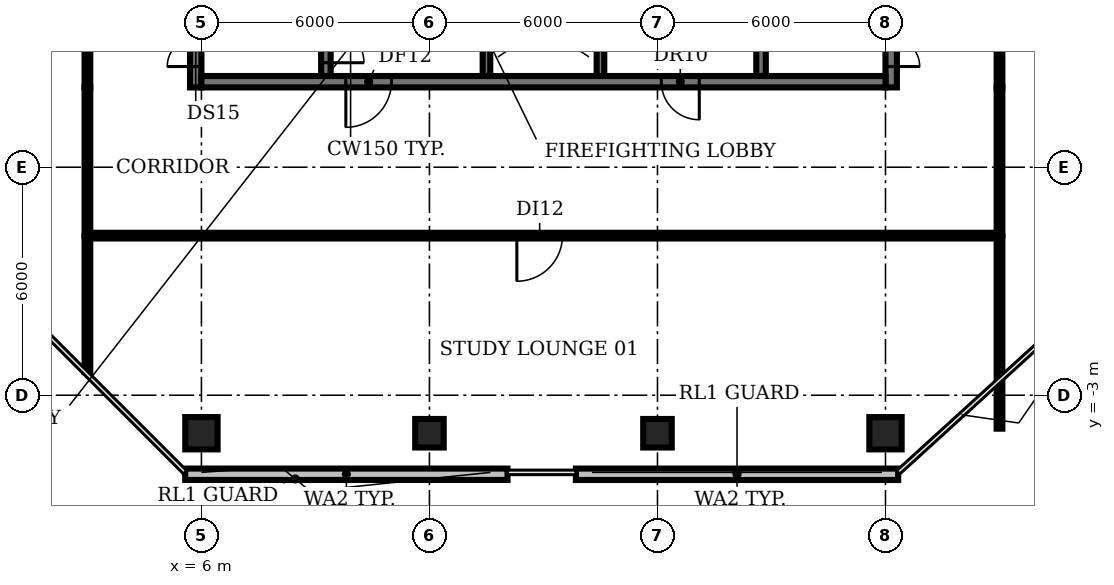
"""IFC4 building model, lengths in metres.
Left out: names, types, materials, properties, quantities, classifications, styles, units other than length and angle.
Written with IfcOpenShell. Run it as: python <this file> out.ifc"""

import sys

from ifc_helpers import new_model, si_unit, direction, frame, frame_2d, origin, origin_2d, place, context, subcontext, project, spatial, rectangle, circle, extrude, element, fill, save


model = new_model("IFC4")
c1 = context("Model", 3, precision=1e-05, world=origin(), true_north=direction((0.0, 1.0)))
c2 = subcontext(c1, "Body", "Model", "MODEL_VIEW")
j1 = project(units=[si_unit("LENGTHUNIT", "METRE"), si_unit("PLANEANGLEUNIT", "RADIAN")], contexts=[c1])
p1 = place(None, origin())
s1 = spatial("IfcSite", under=j1, at=p1, CompositionType="ELEMENT")
p2 = place(p1, origin())
s2 = spatial("IfcBuilding", under=s1, at=p2, CompositionType="ELEMENT")
p3 = place(p2, frame((0.0, 0.0, 310.4)))
s3 = spatial("IfcBuildingStorey", under=s2, at=p3, CompositionType="ELEMENT", Elevation=310.4)
p4 = place(p3, frame((6.0, -4.0, 0.0), z_axis=(0.0, 0.0, 1.0), x_axis=(1.0, 0.0, 0.0)))
e1 = element("IfcColumn", 1, at=p4, inside=s3, PredefinedType="COLUMN", context=c2, shape_type="SweptSolid", body=[
    extrude(circle(Radius=0.425, at=origin_2d()), origin(), (0.0, 0.0, 1.0), 3.9),
])
for number, where, z_axis, x_axis in (
    (2, (12.0, -4.0, 0.0), (0.0, 0.0, 1.0), (1.0, 0.0, 0.0)),
    (3, (18.0, -4.0, 0.0), (0.0, 0.0, 1.0), (1.0, 0.0, 0.0)),
):
    element("IfcColumn", number, at=place(p3, frame(where, z_axis=z_axis, x_axis=x_axis)), inside=s3, PredefinedType="COLUMN", context=c2, shape_type="SweptSolid", body=[
        extrude(rectangle(XDim=0.75, YDim=0.75, at=origin_2d()), origin(), (0.0, 0.0, 1.0), 3.9),
    ])
p5 = place(p3, frame((24.0, -4.0, 0.0), z_axis=(0.0, 0.0, 1.0), x_axis=(1.0, 0.0, 0.0)))
e4 = element("IfcColumn", 4, at=p5, inside=s3, PredefinedType="COLUMN", context=c2, shape_type="SweptSolid", body=[
    extrude(circle(Radius=0.425, at=origin_2d()), origin(), (0.0, 0.0, 1.0), 3.9),
])
for number, where, z_axis, x_axis in (
    (5, (5.573, -5.08, 0.0), (0.0, 0.0, 1.0), (1.0, 0.0, 0.0)),
    (6, (15.854, -5.08, 0.0), (0.0, 0.0, 1.0), (1.0, 0.0, 0.0)),
):
    element("IfcWall", number, at=place(p3, frame(where, z_axis=z_axis, x_axis=x_axis)), inside=s3, PredefinedType="SOLIDWALL", context=c2, shape_type="SweptSolid", body=[
        extrude(rectangle(XDim=8.48, YDim=0.3, at=frame_2d((4.24, 0.0))), origin(), (0.0, 0.0, 1.0), 3.9),
    ])
p6 = place(p3, frame((9.275, 11.825, 0.0), z_axis=(0.0, 0.0, 1.0), x_axis=(0.0, -1.0, 0.0)))
e7 = element("IfcWall", 7, at=p6, inside=s3, PredefinedType="SHEAR", context=c2, shape_type="SweptSolid", body=[
    extrude(rectangle(XDim=6.425, YDim=0.25, at=frame_2d((3.212, 0.0))), origin(), (0.0, 0.0, 1.0), 3.9),
])
p7 = place(p6, frame((5.075, 0.0, 0.0)))
e8 = element("IfcOpeningElement", 8, at=p7, cuts=e7, PredefinedType="OPENING", context=c2, shape_type="SweptSolid", body=[
    extrude(rectangle(XDim=1.0, YDim=2.1, at=frame_2d((0.5, 1.05))), frame((0.0, 0.135, 0.0), z_axis=(0.0, -1.0, 0.0), x_axis=(1.0, 0.0, 0.0)), (0.0, 0.0, 1.0), 0.27),
])
p8 = place(p3, frame((13.5, 5.4, 0.0), z_axis=(0.0, 0.0, 1.0), x_axis=(0.0, 1.0, 0.0)))
e9 = element("IfcWall", 9, at=p8, inside=s3, PredefinedType="SHEAR", context=c2, shape_type="SweptSolid", body=[
    extrude(rectangle(XDim=8.2, YDim=0.2, at=frame_2d((4.1, 0.0))), origin(), (0.0, 0.0, 1.0), 3.9),
])
p9 = place(p8, frame((0.75, 0.0, 0.0)))
e10 = element("IfcOpeningElement", 10, at=p9, cuts=e9, PredefinedType="OPENING", context=c2, shape_type="SweptSolid", body=[
    extrude(rectangle(XDim=1.1, YDim=2.1, at=frame_2d((0.55, 1.05))), frame((0.0, 0.11, 0.0), z_axis=(0.0, -1.0, 0.0), x_axis=(1.0, 0.0, 0.0)), (0.0, 0.0, 1.0), 0.22),
])
p10 = place(p8, frame((3.55, 0.0, 0.0)))
e11 = element("IfcOpeningElement", 11, at=p10, cuts=e9, PredefinedType="OPENING", context=c2, shape_type="SweptSolid", body=[
    extrude(rectangle(XDim=1.1, YDim=2.1, at=frame_2d((0.55, 1.05))), frame((0.0, 0.11, 0.0), z_axis=(0.0, -1.0, 0.0), x_axis=(1.0, 0.0, 0.0)), (0.0, 0.0, 1.0), 0.22),
])
p11 = place(p8, frame((6.35, 0.0, 0.0)))
e12 = element("IfcOpeningElement", 12, at=p11, cuts=e9, PredefinedType="OPENING", context=c2, shape_type="SweptSolid", body=[
    extrude(rectangle(XDim=1.1, YDim=2.1, at=frame_2d((0.55, 1.05))), frame((0.0, 0.11, 0.0), z_axis=(0.0, -1.0, 0.0), x_axis=(1.0, 0.0, 0.0)), (0.0, 0.0, 1.0), 0.22),
])
p12 = place(p3, frame((16.5, 5.4, 0.0), z_axis=(0.0, 0.0, 1.0), x_axis=(0.0, 1.0, 0.0)))
e13 = element("IfcWall", 13, at=p12, inside=s3, PredefinedType="SHEAR", context=c2, shape_type="SweptSolid", body=[
    extrude(rectangle(XDim=8.2, YDim=0.2, at=frame_2d((4.1, 0.0))), origin(), (0.0, 0.0, 1.0), 3.9),
])
p13 = place(p3, frame((20.725, 5.4, 0.0), z_axis=(0.0, 0.0, 1.0), x_axis=(0.0, 1.0, 0.0)))
e14 = element("IfcWall", 14, at=p13, inside=s3, PredefinedType="SHEAR", context=c2, shape_type="SweptSolid", body=[
    extrude(rectangle(XDim=6.3, YDim=0.25, at=frame_2d((3.15, 0.0))), origin(), (0.0, 0.0, 1.0), 3.9),
])
p14 = place(p3, frame((5.85, 5.1, 0.0), z_axis=(0.0, 0.0, 1.0), x_axis=(0.0, 1.0, 0.0)))
e15 = element("IfcWall", 15, at=p14, inside=s3, PredefinedType="SHEAR", context=c2, shape_type="SweptSolid", body=[
    extrude(rectangle(XDim=20.0, YDim=0.3, at=frame_2d((10.0, 0.0))), origin(), (0.0, 0.0, 1.0), 3.9),
])
p15 = place(p14, frame((0.55, 0.0, 0.0)))
e16 = element("IfcOpeningElement", 16, at=p15, cuts=e15, PredefinedType="OPENING", context=c2, shape_type="SweptSolid", body=[
    extrude(rectangle(XDim=1.5, YDim=2.1, at=frame_2d((0.75, 1.05))), frame((0.0, 0.16, 0.0), z_axis=(0.0, -1.0, 0.0), x_axis=(1.0, 0.0, 0.0)), (0.0, 0.0, 1.0), 0.32),
])
p16 = place(p14, frame((7.0, 0.0, 0.0)))
e17 = element("IfcOpeningElement", 17, at=p16, cuts=e15, PredefinedType="OPENING", context=c2, shape_type="SweptSolid", body=[
    extrude(rectangle(XDim=1.2, YDim=2.1, at=frame_2d((0.6, 1.05))), frame((0.0, 0.16, 0.0), z_axis=(0.0, -1.0, 0.0), x_axis=(1.0, 0.0, 0.0)), (0.0, 0.0, 1.0), 0.32),
])
p17 = place(p14, frame((13.55, 0.0, 0.0)))
e18 = element("IfcOpeningElement", 18, at=p17, cuts=e15, PredefinedType="OPENING", context=c2, shape_type="SweptSolid", body=[
    extrude(rectangle(XDim=1.2, YDim=2.1, at=frame_2d((0.6, 1.05))), frame((0.0, 0.16, 0.0), z_axis=(0.0, -1.0, 0.0), x_axis=(1.0, 0.0, 0.0)), (0.0, 0.0, 1.0), 0.32),
])
p18 = place(p3, frame((24.15, 25.655, 0.0), z_axis=(0.0, 0.0, 1.0), x_axis=(0.0, -1.0, 0.0)))
e19 = element("IfcWall", 19, at=p18, inside=s3, PredefinedType="SHEAR", context=c2, shape_type="SweptSolid", body=[
    extrude(rectangle(XDim=20.555, YDim=0.3, at=frame_2d((10.277, 0.0))), origin(), (0.0, 0.0, 1.0), 3.9),
])
p19 = place(p18, frame((18.505, 0.0, 0.0)))
e20 = element("IfcOpeningElement", 20, at=p19, cuts=e19, PredefinedType="OPENING", context=c2, shape_type="SweptSolid", body=[
    extrude(rectangle(XDim=1.5, YDim=2.1, at=frame_2d((0.75, 1.05))), frame((0.0, 0.16, 0.0), z_axis=(0.0, -1.0, 0.0), x_axis=(1.0, 0.0, 0.0)), (0.0, 0.0, 1.0), 0.32),
])
p20 = place(p18, frame((12.405, 0.0, 0.0)))
e21 = element("IfcOpeningElement", 21, at=p20, cuts=e19, PredefinedType="OPENING", context=c2, shape_type="SweptSolid", body=[
    extrude(rectangle(XDim=0.9, YDim=2.1, at=frame_2d((0.45, 1.05))), frame((0.0, 0.16, 0.0), z_axis=(0.0, -1.0, 0.0), x_axis=(1.0, 0.0, 0.0)), (0.0, 0.0, 1.0), 0.32),
])
p21 = place(p18, frame((6.405, 0.0, 0.0)))
e22 = element("IfcOpeningElement", 22, at=p21, cuts=e19, PredefinedType="OPENING", context=c2, shape_type="SweptSolid", body=[
    extrude(rectangle(XDim=2.0, YDim=2.1, at=frame_2d((1.0, 1.05))), frame((0.0, 0.16, 0.0), z_axis=(0.0, -1.0, 0.0), x_axis=(1.0, 0.0, 0.0)), (0.0, 0.0, 1.0), 0.32),
])
p22 = place(p3, frame((24.0, 5.25, 0.0), z_axis=(0.0, 0.0, 1.0), x_axis=(-1.0, 0.0, 0.0)))
e23 = element("IfcWall", 23, at=p22, inside=s3, PredefinedType="SHEAR", context=c2, shape_type="SweptSolid", body=[
    extrude(rectangle(XDim=18.0, YDim=0.3, at=frame_2d((9.0, 0.0))), origin(), (0.0, 0.0, 1.0), 3.9),
])
p23 = place(p22, frame((13.0, 0.0, 0.0)))
e24 = element("IfcOpeningElement", 24, at=p23, cuts=e23, PredefinedType="OPENING", context=c2, shape_type="SweptSolid", body=[
    extrude(rectangle(XDim=1.2, YDim=2.1, at=frame_2d((0.6, 1.05))), frame((0.0, 0.16, 0.0), z_axis=(0.0, -1.0, 0.0), x_axis=(1.0, 0.0, 0.0)), (0.0, 0.0, 1.0), 0.32),
])
p24 = place(p22, frame((4.9, 0.0, 0.0)))
e25 = element("IfcOpeningElement", 25, at=p24, cuts=e23, PredefinedType="OPENING", context=c2, shape_type="SweptSolid", body=[
    extrude(rectangle(XDim=1.0, YDim=2.1, at=frame_2d((0.5, 1.05))), frame((0.0, 0.16, 0.0), z_axis=(0.0, -1.0, 0.0), x_axis=(1.0, 0.0, 0.0)), (0.0, 0.0, 1.0), 0.32),
])
p25 = place(p3, frame((3.0, -2.39, 0.0), z_axis=(0.0, 0.0, 1.0), x_axis=(0.0, 1.0, 0.0)))
e26 = element("IfcWall", 26, at=p25, inside=s3, PredefinedType="PARTITIONING", context=c2, shape_type="SweptSolid", body=[
    extrude(rectangle(XDim=3.59, YDim=0.15, at=frame_2d((1.795, 0.0))), origin(), (0.0, 0.0, 1.0), 2.48),
])
p26 = place(p3, frame((3.0, 1.2, 0.0), z_axis=(0.0, 0.0, 1.0), x_axis=(0.0, 1.0, 0.0)))
e27 = element("IfcWall", 27, at=p26, inside=s3, PredefinedType="PARTITIONING", context=c2, shape_type="SweptSolid", body=[
    extrude(rectangle(XDim=3.9, YDim=0.15, at=frame_2d((1.95, 0.0))), origin(), (0.0, 0.0, 1.0), 2.48),
])
p27 = place(p3, frame((3.0, 5.1, 0.0), z_axis=(0.0, 0.0, 1.0), x_axis=(0.0, 1.0, 0.0)))
e28 = element("IfcWall", 28, at=p27, inside=s3, PredefinedType="PARTITIONING", context=c2, shape_type="SweptSolid", body=[
    extrude(rectangle(XDim=20.0, YDim=0.15, at=frame_2d((10.0, 0.0))), origin(), (0.0, 0.0, 1.0), 2.48),
])
p28 = place(p27, frame((9.3, 0.0, 0.0)))
e29 = element("IfcOpeningElement", 29, at=p28, cuts=e28, PredefinedType="OPENING", context=c2, shape_type="SweptSolid", body=[
    extrude(rectangle(XDim=1.2, YDim=2.1, at=frame_2d((0.6, 1.05))), frame((0.0, 0.085, 0.0), z_axis=(0.0, -1.0, 0.0), x_axis=(1.0, 0.0, 0.0)), (0.0, 0.0, 1.0), 0.17),
])
p29 = place(p3, frame((27.0, -3.88, 0.0), z_axis=(0.0, 0.0, 1.0), x_axis=(0.0, 1.0, 0.0)))
e30 = element("IfcWall", 30, at=p29, inside=s3, PredefinedType="PARTITIONING", context=c2, shape_type="SweptSolid", body=[
    extrude(rectangle(XDim=5.08, YDim=0.15, at=frame_2d((2.54, 0.0))), origin(), (0.0, 0.0, 1.0), 2.48),
])
p30 = place(p3, frame((27.0, 1.2, 0.0), z_axis=(0.0, 0.0, 1.0), x_axis=(-1.0, 0.0, 0.0)))
e31 = element("IfcWall", 31, at=p30, inside=s3, PredefinedType="PARTITIONING", context=c2, shape_type="SweptSolid", body=[
    extrude(rectangle(XDim=24.0, YDim=0.15, at=frame_2d((12.0, 0.0))), origin(), (0.0, 0.0, 1.0), 2.48),
])
p31 = place(p30, frame((11.5, 0.0, 0.0)))
e32 = element("IfcOpeningElement", 32, at=p31, cuts=e31, PredefinedType="OPENING", context=c2, shape_type="SweptSolid", body=[
    extrude(rectangle(XDim=1.2, YDim=2.1, at=frame_2d((0.6, 1.05))), frame((0.0, 0.085, 0.0), z_axis=(0.0, -1.0, 0.0), x_axis=(1.0, 0.0, 0.0)), (0.0, 0.0, 1.0), 0.17),
])
p32 = place(p3, frame((27.0, 1.2, 0.0), z_axis=(0.0, 0.0, 1.0), x_axis=(0.0, 1.0, 0.0)))
e33 = element("IfcWall", 33, at=p32, inside=s3, PredefinedType="PARTITIONING", context=c2, shape_type="SweptSolid", body=[
    extrude(rectangle(XDim=3.9, YDim=0.15, at=frame_2d((1.95, 0.0))), origin(), (0.0, 0.0, 1.0), 2.48),
])
p33 = place(p3, frame((27.0, 14.85, 0.0), z_axis=(0.0, 0.0, 1.0), x_axis=(0.0, -1.0, 0.0)))
e34 = element("IfcWall", 34, at=p33, inside=s3, PredefinedType="PARTITIONING", context=c2, shape_type="SweptSolid", body=[
    extrude(rectangle(XDim=9.75, YDim=0.15, at=frame_2d((4.875, 0.0))), origin(), (0.0, 0.0, 1.0), 2.48),
])
p34 = place(p33, frame((4.15, 0.0, 0.0)))
e35 = element("IfcOpeningElement", 35, at=p34, cuts=e34, PredefinedType="OPENING", context=c2, shape_type="SweptSolid", body=[
    extrude(rectangle(XDim=1.2, YDim=2.1, at=frame_2d((0.6, 1.05))), frame((0.0, 0.085, 0.0), z_axis=(0.0, -1.0, 0.0), x_axis=(1.0, 0.0, 0.0)), (0.0, 0.0, 1.0), 0.17),
])
p35 = place(p7, origin())
e36 = element("IfcDoor", 36, at=p35, inside=s3, OperationType="SINGLE_SWING_RIGHT", PredefinedType="DOOR", context=c2, shape_type="SweptSolid", body=[
    extrude(rectangle(XDim=1.0, YDim=2.1, at=frame_2d((0.5, 1.05))), frame((0.0, 0.025, 0.0), z_axis=(0.0, -1.0, 0.0), x_axis=(1.0, 0.0, 0.0)), (0.0, 0.0, 1.0), 0.05),
])
fill(e8, e36)
p36 = place(p15, origin())
e37 = element("IfcDoor", 37, at=p36, inside=s3, OperationType="DOUBLE_DOOR_SINGLE_SWING", PredefinedType="DOOR", context=c2, shape_type="SweptSolid", body=[
    extrude(rectangle(XDim=1.5, YDim=2.1, at=frame_2d((0.75, 1.05))), frame((0.0, 0.025, 0.0), z_axis=(0.0, -1.0, 0.0), x_axis=(1.0, 0.0, 0.0)), (0.0, 0.0, 1.0), 0.05),
])
fill(e16, e37)
p37 = place(p19, origin())
e38 = element("IfcDoor", 38, at=p37, inside=s3, OperationType="DOUBLE_DOOR_SINGLE_SWING", PredefinedType="DOOR", context=c2, shape_type="SweptSolid", body=[
    extrude(rectangle(XDim=1.5, YDim=2.1, at=frame_2d((0.75, 1.05))), frame((0.0, 0.025, 0.0), z_axis=(0.0, -1.0, 0.0), x_axis=(1.0, 0.0, 0.0)), (0.0, 0.0, 1.0), 0.05),
])
fill(e20, e38)
p38 = place(p23, origin())
e39 = element("IfcDoor", 39, at=p38, inside=s3, OperationType="SINGLE_SWING_RIGHT", PredefinedType="DOOR", context=c2, shape_type="SweptSolid", body=[
    extrude(rectangle(XDim=1.2, YDim=2.1, at=frame_2d((0.6, 1.05))), frame((0.0, 0.025, 0.0), z_axis=(0.0, -1.0, 0.0), x_axis=(1.0, 0.0, 0.0)), (0.0, 0.0, 1.0), 0.05),
])
fill(e24, e39)
p39 = place(p24, origin())
e40 = element("IfcDoor", 40, at=p39, inside=s3, OperationType="SINGLE_SWING_LEFT", PredefinedType="DOOR", context=c2, shape_type="SweptSolid", body=[
    extrude(rectangle(XDim=1.0, YDim=2.1, at=frame_2d((0.5, 1.05))), frame((0.0, 0.025, 0.0), z_axis=(0.0, -1.0, 0.0), x_axis=(1.0, 0.0, 0.0)), (0.0, 0.0, 1.0), 0.05),
])
fill(e25, e40)
p40 = place(p31, origin())
e41 = element("IfcDoor", 41, at=p40, inside=s3, OperationType="SINGLE_SWING_RIGHT", PredefinedType="DOOR", context=c2, shape_type="SweptSolid", body=[
    extrude(rectangle(XDim=1.2, YDim=2.1, at=frame_2d((0.6, 1.05))), frame((0.0, 0.025, 0.0), z_axis=(0.0, -1.0, 0.0), x_axis=(1.0, 0.0, 0.0)), (0.0, 0.0, 1.0), 0.05),
])
fill(e32, e41)
save(model, sys.argv[1])
